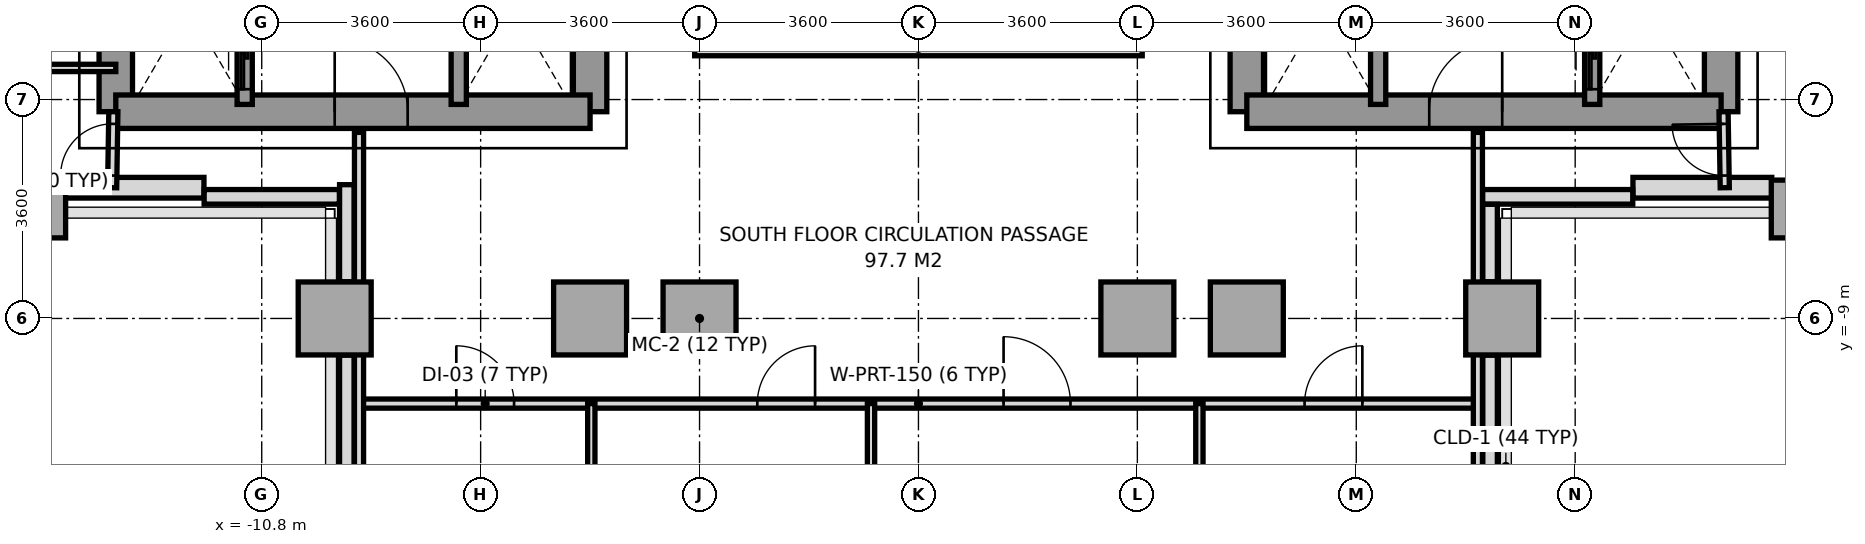
"""IFC4 building model, lengths in metres.
Left out: names, types, materials, properties, quantities, classifications, styles, units other than length and angle.
Written with IfcOpenShell. Run it as: python <this file> out.ifc"""

import sys

from ifc_helpers import new_model, si_unit, direction, frame, frame_2d, origin, origin_2d, place, context, subcontext, project, spatial, rectangle, extrude, source, transform, mapped, element, fill, save


model = new_model("IFC4")
c1 = context("Model", 3, precision=1e-05, world=origin(), true_north=direction((0.0, 1.0)))
c2 = subcontext(c1, "Body", "Model", "MODEL_VIEW")
j1 = project(units=[si_unit("LENGTHUNIT", "METRE"), si_unit("PLANEANGLEUNIT", "RADIAN")], contexts=[c1])
p1 = place(None, origin())
s1 = spatial("IfcSite", under=j1, at=p1, CompositionType="ELEMENT")
p2 = place(p1, origin())
s2 = spatial("IfcBuilding", under=s1, at=p2, CompositionType="ELEMENT")
p3 = place(p2, frame((0.0, 0.0, 74.8)))
s3 = spatial("IfcBuildingStorey", under=s2, at=p3, CompositionType="ELEMENT", Elevation=74.8)
m1 = source(origin(), c2, "Body", "SweptSolid", [
    extrude(rectangle(XDim=0.75, YDim=0.95, at=origin_2d()), origin(), (0.0, 0.0, 1.0), 3.2),
])
p4 = place(p3, frame((-14.4, -7.2, 0.0), z_axis=(0.0, 0.0, 1.0), x_axis=(1.0, 0.0, 0.0)))
e1 = element("IfcColumn", 1, at=p4, inside=s3, PredefinedType="COLUMN", context=c2, shape_type="MappedRepresentation", body=[
    mapped(m1, transform((0.0, 0.0, 0.0), x_axis=(1.0, 0.0, 0.0), y_axis=(0.0, 1.0, 0.0), z_axis=(0.0, 0.0, 1.0), scale=1.0)),
])
m2 = source(origin(), c2, "Body", "SweptSolid", [
    extrude(rectangle(XDim=1.2, YDim=1.2, at=origin_2d()), origin(), (0.0, 0.0, 1.0), 3.2),
])
for number, where, z_axis, x_axis in (
    (2, (-9.6, -9.0, 0.0), (0.0, 0.0, 1.0), (1.0, 0.0, 0.0)),
    (3, (-5.4, -9.0, 0.0), (0.0, 0.0, 1.0), (1.0, 0.0, 0.0)),
    (4, (-3.6, -9.0, 0.0), (0.0, 0.0, 1.0), (1.0, 0.0, 0.0)),
    (5, (3.6, -9.0, 0.0), (0.0, 0.0, 1.0), (1.0, 0.0, 0.0)),
    (6, (5.4, -9.0, 0.0), (0.0, 0.0, 1.0), (1.0, 0.0, 0.0)),
    (7, (9.6, -9.0, 0.0), (0.0, 0.0, 1.0), (1.0, 0.0, 0.0)),
):
    element("IfcColumn", number, at=place(p3, frame(where, z_axis=z_axis, x_axis=x_axis)), inside=s3, PredefinedType="COLUMN", context=c2, shape_type="MappedRepresentation", body=[
        mapped(m2, transform((0.0, 0.0, 0.0), x_axis=(1.0, 0.0, 0.0), y_axis=(0.0, 1.0, 0.0), z_axis=(0.0, 0.0, 1.0), scale=1.0)),
    ])
p5 = place(p3, frame((14.4, -7.2, 0.0), z_axis=(0.0, 0.0, 1.0), x_axis=(1.0, 0.0, 0.0)))
e8 = element("IfcColumn", 8, at=p5, inside=s3, PredefinedType="COLUMN", context=c2, shape_type="MappedRepresentation", body=[
    mapped(m1, transform((0.0, 0.0, 0.0), x_axis=(1.0, 0.0, 0.0), y_axis=(0.0, 1.0, 0.0), z_axis=(0.0, 0.0, 1.0), scale=1.0)),
])
for number, where, z_axis, x_axis in (
    (9, (-14.033, -6.85, 0.0), (0.0, 0.0, 1.0), (1.0, 0.0, 0.0)),
    (10, (11.75, -6.85, 0.0), (0.0, 0.0, 1.0), (1.0, 0.0, 0.0)),
):
    element("IfcWall", number, at=place(p3, frame(where, z_axis=z_axis, x_axis=x_axis)), inside=s3, PredefinedType="SOLIDWALL", context=c2, shape_type="SweptSolid", body=[
        extrude(rectangle(XDim=2.283, YDim=0.34, at=frame_2d((1.142, 0.0))), origin(), (0.0, 0.0, 1.0), 3.2),
    ])
p6 = place(p3, frame((11.747, -7.0, 0.0), z_axis=(0.0, 0.0, 1.0), x_axis=(-1.0, 0.0, 0.0)))
e11 = element("IfcWall", 11, at=p6, inside=s3, PredefinedType="PARAPET", context=c2, shape_type="SweptSolid", body=[
    extrude(rectangle(XDim=2.469, YDim=0.24, at=frame_2d((1.234, 0.0))), origin(), (0.0, 0.0, 1.0), 1.15),
])
p7 = place(p3, frame((9.4, -7.123, 0.0), z_axis=(0.0, 0.0, 1.0), x_axis=(0.0, -1.0, 0.0)))
e12 = element("IfcWall", 12, at=p7, inside=s3, PredefinedType="PARAPET", context=c2, shape_type="SweptSolid", body=[
    extrude(rectangle(XDim=1.274, YDim=0.24, at=frame_2d((0.637, 0.0))), origin(), (0.0, 0.0, 1.0), 1.15),
])
p8 = place(p3, frame((9.4, -9.603, 0.0), z_axis=(0.0, 0.0, 1.0), x_axis=(0.0, -1.0, 0.0)))
e13 = element("IfcWall", 13, at=p8, inside=s3, PredefinedType="PARAPET", context=c2, shape_type="SweptSolid", body=[
    extrude(rectangle(XDim=6.0, YDim=0.24, at=frame_2d((3.0, 0.0))), origin(), (0.0, 0.0, 1.0), 1.15),
])
p9 = place(p3, frame((-9.4, -15.358, 0.0), z_axis=(0.0, 0.0, 1.0), x_axis=(0.0, 1.0, 0.0)))
e14 = element("IfcWall", 14, at=p9, inside=s3, PredefinedType="PARAPET", context=c2, shape_type="SweptSolid", body=[
    extrude(rectangle(XDim=5.755, YDim=0.24, at=frame_2d((2.877, 0.0))), origin(), (0.0, 0.0, 1.0), 1.15),
])
p10 = place(p3, frame((-9.4, -8.397, 0.0), z_axis=(0.0, 0.0, 1.0), x_axis=(0.0, 1.0, 0.0)))
e15 = element("IfcWall", 15, at=p10, inside=s3, PredefinedType="PARAPET", context=c2, shape_type="SweptSolid", body=[
    extrude(rectangle(XDim=1.597, YDim=0.24, at=frame_2d((0.798, 0.0))), origin(), (0.0, 0.0, 1.0), 1.15),
])
p11 = place(p3, frame((-9.523, -7.0, 0.0), z_axis=(0.0, 0.0, 1.0), x_axis=(-1.0, 0.0, 0.0)))
e16 = element("IfcWall", 16, at=p11, inside=s3, PredefinedType="PARAPET", context=c2, shape_type="SweptSolid", body=[
    extrude(rectangle(XDim=2.224, YDim=0.24, at=frame_2d((1.112, 0.0))), origin(), (0.0, 0.0, 1.0), 1.15),
])
p12 = place(p3, frame((-13.2, -5.6, 0.0), z_axis=(0.0, 0.0, 1.0), x_axis=(0.0, 1.0, 0.0)))
e17 = element("IfcWall", 17, at=p12, inside=s3, PredefinedType="SHEAR", context=c2, shape_type="SweptSolid", body=[
    extrude(rectangle(XDim=11.2, YDim=0.55, at=frame_2d((5.6, 0.0))), origin(), (0.0, 0.0, 1.0), 3.2),
])
p13 = place(p3, frame((-5.4, -5.6, 0.0), z_axis=(0.0, 0.0, 1.0), x_axis=(0.0, 1.0, 0.0)))
e18 = element("IfcWall", 18, at=p13, inside=s3, PredefinedType="SHEAR", context=c2, shape_type="SweptSolid", body=[
    extrude(rectangle(XDim=12.5, YDim=0.55, at=frame_2d((6.25, 0.0))), origin(), (0.0, 0.0, 1.0), 3.2),
])
p14 = place(p13, frame((4.55, 0.0, 0.0)))
e19 = element("IfcOpeningElement", 19, at=p14, cuts=e18, PredefinedType="OPENING", context=c2, shape_type="SweptSolid", body=[
    extrude(rectangle(XDim=1.2, YDim=2.2, at=frame_2d((0.6, 1.1))), frame((0.0, 0.285, 0.0), z_axis=(0.0, -1.0, 0.0), x_axis=(1.0, 0.0, 0.0)), (0.0, 0.0, 1.0), 0.57),
])
p15 = place(p13, frame((6.86, 0.0, 0.0)))
e20 = element("IfcOpeningElement", 20, at=p15, cuts=e18, PredefinedType="OPENING", context=c2, shape_type="SweptSolid", body=[
    extrude(rectangle(XDim=0.8, YDim=2.1, at=frame_2d((0.4, 1.05))), frame((0.0, 0.285, 0.0), z_axis=(0.0, -1.0, 0.0), x_axis=(1.0, 0.0, 0.0)), (0.0, 0.0, 1.0), 0.57),
])
p16 = place(p3, frame((-13.2, -5.6, 0.0), z_axis=(0.0, 0.0, 1.0), x_axis=(1.0, 0.0, 0.0)))
e21 = element("IfcWall", 21, at=p16, inside=s3, PredefinedType="SHEAR", context=c2, shape_type="SweptSolid", body=[
    extrude(rectangle(XDim=7.8, YDim=0.55, at=frame_2d((3.9, 0.0))), origin(), (0.0, 0.0, 1.0), 3.2),
])
p17 = place(p16, frame((3.6, 0.0, 0.0)))
e22 = element("IfcOpeningElement", 22, at=p17, cuts=e21, PredefinedType="OPENING", context=c2, shape_type="SweptSolid", body=[
    extrude(rectangle(XDim=1.2, YDim=2.2, at=frame_2d((0.6, 1.1))), frame((0.0, 0.285, 0.0), z_axis=(0.0, -1.0, 0.0), x_axis=(1.0, 0.0, 0.0)), (0.0, 0.0, 1.0), 0.57),
])
p18 = place(p3, frame((13.2, -5.6, 0.0), z_axis=(0.0, 0.0, 1.0), x_axis=(0.0, 1.0, 0.0)))
e23 = element("IfcWall", 23, at=p18, inside=s3, PredefinedType="SHEAR", context=c2, shape_type="SweptSolid", body=[
    extrude(rectangle(XDim=11.2, YDim=0.55, at=frame_2d((5.6, 0.0))), origin(), (0.0, 0.0, 1.0), 3.2),
])
p19 = place(p3, frame((5.4, -5.6, 0.0), z_axis=(0.0, 0.0, 1.0), x_axis=(0.0, 1.0, 0.0)))
e24 = element("IfcWall", 24, at=p19, inside=s3, PredefinedType="SHEAR", context=c2, shape_type="SweptSolid", body=[
    extrude(rectangle(XDim=12.5, YDim=0.55, at=frame_2d((6.25, 0.0))), origin(), (0.0, 0.0, 1.0), 3.2),
])
p20 = place(p19, frame((4.55, 0.0, 0.0)))
e25 = element("IfcOpeningElement", 25, at=p20, cuts=e24, PredefinedType="OPENING", context=c2, shape_type="SweptSolid", body=[
    extrude(rectangle(XDim=1.2, YDim=2.2, at=frame_2d((0.6, 1.1))), frame((0.0, 0.285, 0.0), z_axis=(0.0, -1.0, 0.0), x_axis=(1.0, 0.0, 0.0)), (0.0, 0.0, 1.0), 0.57),
])
p21 = place(p19, frame((6.86, 0.0, 0.0)))
e26 = element("IfcOpeningElement", 26, at=p21, cuts=e24, PredefinedType="OPENING", context=c2, shape_type="SweptSolid", body=[
    extrude(rectangle(XDim=0.8, YDim=2.1, at=frame_2d((0.4, 1.05))), frame((0.0, 0.285, 0.0), z_axis=(0.0, -1.0, 0.0), x_axis=(1.0, 0.0, 0.0)), (0.0, 0.0, 1.0), 0.57),
])
p22 = place(p3, frame((5.4, -5.6, 0.0), z_axis=(0.0, 0.0, 1.0), x_axis=(1.0, 0.0, 0.0)))
e27 = element("IfcWall", 27, at=p22, inside=s3, PredefinedType="SHEAR", context=c2, shape_type="SweptSolid", body=[
    extrude(rectangle(XDim=7.8, YDim=0.55, at=frame_2d((3.9, 0.0))), origin(), (0.0, 0.0, 1.0), 3.2),
])
p23 = place(p22, frame((3.0, 0.0, 0.0)))
e28 = element("IfcOpeningElement", 28, at=p23, cuts=e27, PredefinedType="OPENING", context=c2, shape_type="SweptSolid", body=[
    extrude(rectangle(XDim=1.2, YDim=2.2, at=frame_2d((0.6, 1.1))), frame((0.0, 0.285, 0.0), z_axis=(0.0, -1.0, 0.0), x_axis=(1.0, 0.0, 0.0)), (0.0, 0.0, 1.0), 0.57),
])
p24 = place(p3, frame((-11.08, -5.48, 0.0), z_axis=(0.0, 0.0, 1.0), x_axis=(0.0, 1.0, 0.0)))
e29 = element("IfcWall", 29, at=p24, inside=s3, PredefinedType="SOLIDWALL", context=c2, shape_type="SweptSolid", body=[
    extrude(rectangle(XDim=1.6, YDim=0.25, at=frame_2d((0.8, 0.0))), origin(), (0.0, 0.0, 1.0), 3.2),
])
p25 = place(p24, frame((0.25, 0.0, 0.0)))
e30 = element("IfcOpeningElement", 30, at=p25, cuts=e29, PredefinedType="OPENING", context=c2, shape_type="SweptSolid", body=[
    extrude(rectangle(XDim=1.1, YDim=2.2, at=frame_2d((0.55, 1.1))), frame((0.0, 0.135, 0.0), z_axis=(0.0, -1.0, 0.0), x_axis=(1.0, 0.0, 0.0)), (0.0, 0.0, 1.0), 0.27),
])
p26 = place(p3, frame((11.08, -5.48, 0.0), z_axis=(0.0, 0.0, 1.0), x_axis=(0.0, 1.0, 0.0)))
e31 = element("IfcWall", 31, at=p26, inside=s3, PredefinedType="SOLIDWALL", context=c2, shape_type="SweptSolid", body=[
    extrude(rectangle(XDim=1.6, YDim=0.25, at=frame_2d((0.8, 0.0))), origin(), (0.0, 0.0, 1.0), 3.2),
])
p27 = place(p26, frame((0.25, 0.0, 0.0)))
e32 = element("IfcOpeningElement", 32, at=p27, cuts=e31, PredefinedType="OPENING", context=c2, shape_type="SweptSolid", body=[
    extrude(rectangle(XDim=1.1, YDim=2.2, at=frame_2d((0.55, 1.1))), frame((0.0, 0.135, 0.0), z_axis=(0.0, -1.0, 0.0), x_axis=(1.0, 0.0, 0.0)), (0.0, 0.0, 1.0), 0.27),
])
for number, where, z_axis, x_axis in (
    (33, (-7.56, -5.48, 0.0), (0.0, 0.0, 1.0), (0.0, 1.0, 0.0)),
    (34, (7.56, -5.48, 0.0), (0.0, 0.0, 1.0), (0.0, 1.0, 0.0)),
):
    element("IfcWall", number, at=place(p3, frame(where, z_axis=z_axis, x_axis=x_axis)), inside=s3, PredefinedType="SOLIDWALL", context=c2, shape_type="SweptSolid", body=[
        extrude(rectangle(XDim=1.6, YDim=0.25, at=frame_2d((0.8, 0.0))), origin(), (0.0, 0.0, 1.0), 3.2),
    ])
p28 = place(p3, frame((-9.2, -10.4, 0.0), z_axis=(0.0, 0.0, 1.0), x_axis=(1.0, 0.0, 0.0)))
e35 = element("IfcWall", 35, at=p28, inside=s3, PredefinedType="PARTITIONING", context=c2, shape_type="SweptSolid", body=[
    extrude(rectangle(XDim=18.4, YDim=0.15, at=frame_2d((9.2, 0.0))), origin(), (0.0, 0.0, 1.0), 3.2),
])
p29 = place(p28, frame((1.6, 0.0, 0.0)))
e36 = element("IfcOpeningElement", 36, at=p29, cuts=e35, PredefinedType="OPENING", context=c2, shape_type="SweptSolid", body=[
    extrude(rectangle(XDim=0.95, YDim=2.15, at=frame_2d((0.475, 1.075))), frame((0.0, 0.085, 0.0), z_axis=(0.0, -1.0, 0.0), x_axis=(1.0, 0.0, 0.0)), (0.0, 0.0, 1.0), 0.17),
])
p30 = place(p28, frame((6.55, 0.0, 0.0)))
e37 = element("IfcOpeningElement", 37, at=p30, cuts=e35, PredefinedType="OPENING", context=c2, shape_type="SweptSolid", body=[
    extrude(rectangle(XDim=0.95, YDim=2.15, at=frame_2d((0.475, 1.075))), frame((0.0, 0.085, 0.0), z_axis=(0.0, -1.0, 0.0), x_axis=(1.0, 0.0, 0.0)), (0.0, 0.0, 1.0), 0.17),
])
p31 = place(p28, frame((10.6, 0.0, 0.0)))
e38 = element("IfcOpeningElement", 38, at=p31, cuts=e35, PredefinedType="OPENING", context=c2, shape_type="SweptSolid", body=[
    extrude(rectangle(XDim=1.1, YDim=2.2, at=frame_2d((0.55, 1.1))), frame((0.0, 0.085, 0.0), z_axis=(0.0, -1.0, 0.0), x_axis=(1.0, 0.0, 0.0)), (0.0, 0.0, 1.0), 0.17),
])
p32 = place(p28, frame((15.55, 0.0, 0.0)))
e39 = element("IfcOpeningElement", 39, at=p32, cuts=e35, PredefinedType="OPENING", context=c2, shape_type="SweptSolid", body=[
    extrude(rectangle(XDim=0.95, YDim=2.15, at=frame_2d((0.475, 1.075))), frame((0.0, 0.085, 0.0), z_axis=(0.0, -1.0, 0.0), x_axis=(1.0, 0.0, 0.0)), (0.0, 0.0, 1.0), 0.17),
])
for number, where, z_axis, x_axis in (
    (40, (-9.2, -15.68, 0.0), (0.0, 0.0, 1.0), (0.0, 1.0, 0.0)),
    (41, (9.2, -15.68, 0.0), (0.0, 0.0, 1.0), (0.0, 1.0, 0.0)),
):
    element("IfcWall", number, at=place(p3, frame(where, z_axis=z_axis, x_axis=x_axis)), inside=s3, PredefinedType="PARTITIONING", context=c2, shape_type="SweptSolid", body=[
        extrude(rectangle(XDim=9.74, YDim=0.15, at=frame_2d((4.87, 0.0))), origin(), (0.0, 0.0, 1.0), 2.71),
    ])
for number, where, z_axis, x_axis in (
    (42, (-5.38, -24.65, 0.0), (0.0, 0.0, 1.0), (0.0, 1.0, 0.0)),
    (43, (-0.78, -24.65, 0.0), (0.0, 0.0, 1.0), (0.0, 1.0, 0.0)),
    (44, (4.62, -24.65, 0.0), (0.0, 0.0, 1.0), (0.0, 1.0, 0.0)),
):
    element("IfcWall", number, at=place(p3, frame(where, z_axis=z_axis, x_axis=x_axis)), inside=s3, PredefinedType="PARTITIONING", context=c2, shape_type="SweptSolid", body=[
        extrude(rectangle(XDim=14.25, YDim=0.12, at=frame_2d((7.125, 0.0))), origin(), (0.0, 0.0, 1.0), 2.71),
    ])
p33 = place(p3, frame((-13.26, -6.85, 0.0), z_axis=(0.0, 0.0, 1.0), x_axis=(0.016013571389, 0.999871774545, 0.0)))
e45 = element("IfcWall", 45, at=p33, inside=s3, PredefinedType="PARTITIONING", context=c2, shape_type="SweptSolid", body=[
    extrude(rectangle(XDim=1.25, YDim=0.15, at=frame_2d((0.625, 0.0))), origin(), (0.0, 0.0, 1.0), 3.2),
])
p34 = place(p33, frame((0.2, 0.0, 0.0)))
e46 = element("IfcOpeningElement", 46, at=p34, cuts=e45, PredefinedType="OPENING", context=c2, shape_type="SweptSolid", body=[
    extrude(rectangle(XDim=0.85, YDim=2.1, at=frame_2d((0.425, 1.05))), frame((0.0, 0.085, 0.0), z_axis=(0.0, -1.0, 0.0), x_axis=(1.0, 0.0, 0.0)), (0.0, 0.0, 1.0), 0.17),
])
p35 = place(p3, frame((-24.57, -4.88, 0.0), z_axis=(0.0, 0.0, 1.0), x_axis=(1.0, 0.0, 0.0)))
e47 = element("IfcWall", 47, at=p35, inside=s3, PredefinedType="PARTITIONING", context=c2, shape_type="SweptSolid", body=[
    extrude(rectangle(XDim=11.37, YDim=0.12, at=frame_2d((5.685, 0.0))), origin(), (0.0, 0.0, 1.0), 2.7),
])
p36 = place(p35, frame((2.2, 0.0, 0.0)))
e48 = element("IfcOpeningElement", 48, at=p36, cuts=e47, PredefinedType="OPENING", context=c2, shape_type="SweptSolid", body=[
    extrude(rectangle(XDim=0.95, YDim=2.15, at=frame_2d((0.475, 1.075))), frame((0.0, 0.07, 0.0), z_axis=(0.0, -1.0, 0.0), x_axis=(1.0, 0.0, 0.0)), (0.0, 0.0, 1.0), 0.14),
])
p37 = place(p3, frame((13.26, -6.85, 0.0), z_axis=(0.0, 0.0, 1.0), x_axis=(-0.016013571389, 0.999871774545, 0.0)))
e49 = element("IfcWall", 49, at=p37, inside=s3, PredefinedType="PARTITIONING", context=c2, shape_type="SweptSolid", body=[
    extrude(rectangle(XDim=1.25, YDim=0.15, at=frame_2d((0.625, 0.0))), origin(), (0.0, 0.0, 1.0), 3.2),
])
p38 = place(p37, frame((0.2, 0.0, 0.0)))
e50 = element("IfcOpeningElement", 50, at=p38, cuts=e49, PredefinedType="OPENING", context=c2, shape_type="SweptSolid", body=[
    extrude(rectangle(XDim=0.85, YDim=2.1, at=frame_2d((0.425, 1.05))), frame((0.0, 0.085, 0.0), z_axis=(0.0, -1.0, 0.0), x_axis=(1.0, 0.0, 0.0)), (0.0, 0.0, 1.0), 0.17),
])
p39 = place(p3, frame((-3.68, -4.56, 0.0), z_axis=(0.0, 0.0, 1.0), x_axis=(1.0, 0.0, 0.0)))
e51 = element("IfcWall", 51, at=p39, inside=s3, PredefinedType="PARAPET", context=c2, shape_type="SweptSolid", body=[
    extrude(rectangle(XDim=7.36, YDim=0.24, at=frame_2d((3.68, 0.0))), origin(), (0.0, 0.0, 1.0), 1.15),
])
m3 = source(origin(), c2, "Body", "SweptSolid", [
    extrude(rectangle(XDim=1.2, YDim=2.2, at=frame_2d((0.6, 1.1))), frame((0.0, 0.025, 0.0), z_axis=(0.0, -1.0, 0.0), x_axis=(1.0, 0.0, 0.0)), (0.0, 0.0, 1.0), 0.05),
])
p40 = place(p17, origin())
e52 = element("IfcDoor", 52, at=p40, inside=s3, OperationType="SINGLE_SWING_LEFT", PredefinedType="DOOR", context=c2, shape_type="MappedRepresentation", body=[
    mapped(m3, transform((0.0, 0.0, 0.0), x_axis=(1.0, 0.0, 0.0), y_axis=(0.0, 1.0, 0.0), z_axis=(0.0, 0.0, 1.0), scale=1.0)),
])
fill(e22, e52)
p41 = place(p23, origin())
e53 = element("IfcDoor", 53, at=p41, inside=s3, OperationType="SINGLE_SWING_RIGHT", PredefinedType="DOOR", context=c2, shape_type="MappedRepresentation", body=[
    mapped(m3, transform((0.0, 0.0, 0.0), x_axis=(1.0, 0.0, 0.0), y_axis=(0.0, 1.0, 0.0), z_axis=(0.0, 0.0, 1.0), scale=1.0)),
])
fill(e28, e53)
m4 = source(origin(), c2, "Body", "SweptSolid", [
    extrude(rectangle(XDim=1.1, YDim=2.2, at=frame_2d((0.55, 1.1))), frame((0.0, 0.025, 0.0), z_axis=(0.0, -1.0, 0.0), x_axis=(1.0, 0.0, 0.0)), (0.0, 0.0, 1.0), 0.05),
])
p42 = place(p25, origin())
e54 = element("IfcDoor", 54, at=p42, inside=s3, OperationType="SLIDING_TO_LEFT", PredefinedType="DOOR", context=c2, shape_type="MappedRepresentation", body=[
    mapped(m4, transform((0.0, 0.0, 0.0), x_axis=(1.0, 0.0, 0.0), y_axis=(0.0, 1.0, 0.0), z_axis=(0.0, 0.0, 1.0), scale=1.0)),
])
fill(e30, e54)
p43 = place(p27, origin())
e55 = element("IfcDoor", 55, at=p43, inside=s3, OperationType="SLIDING_TO_LEFT", PredefinedType="DOOR", context=c2, shape_type="MappedRepresentation", body=[
    mapped(m4, transform((0.0, 0.0, 0.0), x_axis=(1.0, 0.0, 0.0), y_axis=(0.0, 1.0, 0.0), z_axis=(0.0, 0.0, 1.0), scale=1.0)),
])
fill(e32, e55)
m5 = source(origin(), c2, "Body", "SweptSolid", [
    extrude(rectangle(XDim=0.95, YDim=2.15, at=frame_2d((0.475, 1.075))), frame((0.0, 0.025, 0.0), z_axis=(0.0, -1.0, 0.0), x_axis=(1.0, 0.0, 0.0)), (0.0, 0.0, 1.0), 0.05),
])
p44 = place(p29, origin())
e56 = element("IfcDoor", 56, at=p44, inside=s3, OperationType="SINGLE_SWING_LEFT", PredefinedType="DOOR", context=c2, shape_type="MappedRepresentation", body=[
    mapped(m5, transform((0.0, 0.0, 0.0), x_axis=(1.0, 0.0, 0.0), y_axis=(0.0, 1.0, 0.0), z_axis=(0.0, 0.0, 1.0), scale=1.0)),
])
fill(e36, e56)
p45 = place(p30, origin())
e57 = element("IfcDoor", 57, at=p45, inside=s3, OperationType="SINGLE_SWING_RIGHT", PredefinedType="DOOR", context=c2, shape_type="MappedRepresentation", body=[
    mapped(m5, transform((0.0, 0.0, 0.0), x_axis=(1.0, 0.0, 0.0), y_axis=(0.0, 1.0, 0.0), z_axis=(0.0, 0.0, 1.0), scale=1.0)),
])
fill(e37, e57)
p46 = place(p31, origin())
e58 = element("IfcDoor", 58, at=p46, inside=s3, OperationType="SINGLE_SWING_LEFT", PredefinedType="DOOR", context=c2, shape_type="MappedRepresentation", body=[
    mapped(m4, transform((0.0, 0.0, 0.0), x_axis=(1.0, 0.0, 0.0), y_axis=(0.0, 1.0, 0.0), z_axis=(0.0, 0.0, 1.0), scale=1.0)),
])
fill(e38, e58)
p47 = place(p32, origin())
e59 = element("IfcDoor", 59, at=p47, inside=s3, OperationType="SINGLE_SWING_RIGHT", PredefinedType="DOOR", context=c2, shape_type="MappedRepresentation", body=[
    mapped(m5, transform((0.0, 0.0, 0.0), x_axis=(1.0, 0.0, 0.0), y_axis=(0.0, 1.0, 0.0), z_axis=(0.0, 0.0, 1.0), scale=1.0)),
])
fill(e39, e59)
m6 = source(origin(), c2, "Body", "SweptSolid", [
    extrude(rectangle(XDim=0.85, YDim=2.1, at=frame_2d((0.425, 1.05))), frame((0.0, 0.025, 0.0), z_axis=(0.0, -1.0, 0.0), x_axis=(1.0, 0.0, 0.0)), (0.0, 0.0, 1.0), 0.05),
])
p48 = place(p34, origin())
e60 = element("IfcDoor", 60, at=p48, inside=s3, OperationType="SINGLE_SWING_LEFT", PredefinedType="DOOR", context=c2, shape_type="MappedRepresentation", body=[
    mapped(m6, transform((0.0, 0.0, 0.0), x_axis=(1.0, 0.0, 0.0), y_axis=(0.0, 1.0, 0.0), z_axis=(0.0, 0.0, 1.0), scale=1.0)),
])
fill(e46, e60)
p49 = place(p38, origin())
e61 = element("IfcDoor", 61, at=p49, inside=s3, OperationType="SINGLE_SWING_RIGHT", PredefinedType="DOOR", context=c2, shape_type="MappedRepresentation", body=[
    mapped(m6, transform((0.0, 0.0, 0.0), x_axis=(1.0, 0.0, 0.0), y_axis=(0.0, 1.0, 0.0), z_axis=(0.0, 0.0, 1.0), scale=1.0)),
])
fill(e50, e61)
save(model, sys.argv[1])
